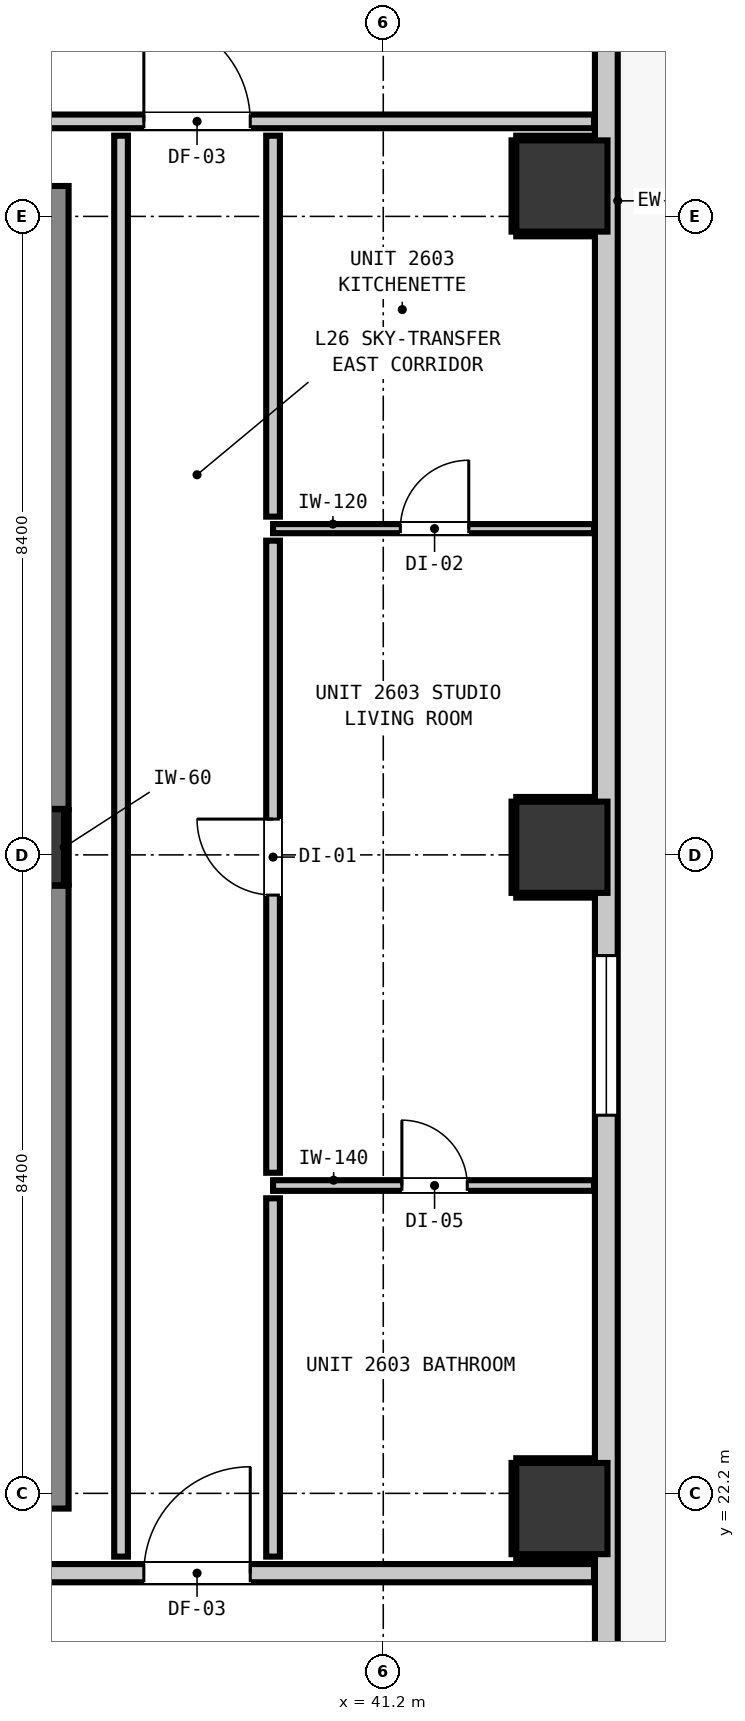
"""IFC4 building model, lengths in metres.
Left out: names, types, materials, properties, quantities, classifications, styles, units other than length and angle.
Written with IfcOpenShell. Run it as: python <this file> out.ifc"""

import sys

from ifc_helpers import new_model, si_unit, direction, frame, frame_2d, origin, origin_2d, place, context, subcontext, project, spatial, rectangle, extrude, element, fill, save


model = new_model("IFC4")
c1 = context("Model", 3, precision=1e-05, world=origin(), true_north=direction((0.0, 1.0)))
c2 = subcontext(c1, "Body", "Model", "MODEL_VIEW")
j1 = project(units=[si_unit("LENGTHUNIT", "METRE"), si_unit("PLANEANGLEUNIT", "RADIAN")], contexts=[c1])
p1 = place(None, origin())
s1 = spatial("IfcSite", under=j1, at=p1, CompositionType="ELEMENT")
p2 = place(p1, origin())
s2 = spatial("IfcBuilding", under=s1, at=p2, CompositionType="ELEMENT")
p3 = place(p2, frame((0.0, 0.0, 92.8)))
s3 = spatial("IfcBuildingStorey", under=s2, at=p3, CompositionType="ELEMENT", Elevation=92.8)
p4 = place(p3, frame((36.5, 30.7, 0.0), z_axis=(0.0, 0.0, 1.0), x_axis=(1.0, 0.0, 0.0)))
e1 = element("IfcColumn", 1, at=p4, inside=s3, PredefinedType="COLUMN", context=c2, shape_type="SweptSolid", body=[
    extrude(rectangle(XDim=1.0, YDim=1.0, at=origin_2d()), origin(), (0.0, 0.0, 1.0), 3.32),
])
p5 = place(p3, frame((36.56, 22.0, 0.0), z_axis=(0.0, 0.0, 1.0), x_axis=(0.0, 1.0, 0.0)))
e2 = element("IfcWall", 2, at=p5, inside=s3, PredefinedType="SHEAR", context=c2, shape_type="SweptSolid", body=[
    extrude(rectangle(XDim=8.195, YDim=1.0, at=frame_2d((4.098, 0.0))), origin(), (0.0, 0.0, 1.0), 3.32),
])
p6 = place(p3, frame((36.56, 31.205, 0.0), z_axis=(0.0, 0.0, 1.0), x_axis=(0.0, 1.0, 0.0)))
e3 = element("IfcWall", 3, at=p6, inside=s3, PredefinedType="SHEAR", context=c2, shape_type="SweptSolid", body=[
    extrude(rectangle(XDim=8.195, YDim=1.0, at=frame_2d((4.097, 0.0))), origin(), (0.0, 0.0, 1.0), 3.32),
])
for number, where, z_axis, x_axis in (
    (4, (43.55, 22.0, 0.0), (0.0, 0.0, 1.0), (1.0, 0.0, 0.0)),
    (5, (43.55, 30.7, 0.0), (0.0, 0.0, 1.0), (1.0, 0.0, 0.0)),
    (6, (43.55, 39.4, 0.0), (0.0, 0.0, 1.0), (1.0, 0.0, 0.0)),
):
    element("IfcColumn", number, at=place(p3, frame(where, z_axis=z_axis, x_axis=x_axis)), inside=s3, PredefinedType="COLUMN", context=c2, shape_type="SweptSolid", body=[
        extrude(rectangle(XDim=1.2, YDim=1.2, at=origin_2d()), origin(), (0.0, 0.0, 1.0), 3.32),
    ])
p7 = place(p3, frame((44.135, 51.035, 0.0), z_axis=(0.0, 0.0, 1.0), x_axis=(0.0, -1.0, 0.0)))
e7 = element("IfcWall", 7, at=p7, inside=s3, PredefinedType="STANDARD", context=c2, shape_type="SweptSolid", body=[
    extrude(rectangle(XDim=34.67, YDim=0.3, at=frame_2d((17.335, 0.0))), origin(), (0.0, 0.0, 1.0), 3.06),
])
p8 = place(p7, frame((0.901, 0.0, 0.0)))
e8 = element("IfcOpeningElement", 8, at=p8, cuts=e7, PredefinedType="OPENING", context=c2, shape_type="SweptSolid", body=[
    extrude(rectangle(XDim=1.0, YDim=2.15, at=frame_2d((0.5, 1.075))), frame((0.0, 0.16, 0.0), z_axis=(0.0, -1.0, 0.0), x_axis=(1.0, 0.0, 0.0)), (0.0, 0.0, 1.0), 0.32),
])
p9 = place(p7, frame((32.083, 0.0, 0.85)))
e9 = element("IfcOpeningElement", 9, at=p9, cuts=e7, PredefinedType="OPENING", context=c2, shape_type="SweptSolid", body=[
    extrude(rectangle(XDim=2.1, YDim=1.9, at=frame_2d((1.05, 0.95))), frame((0.0, 0.16, 0.0), z_axis=(0.0, -1.0, 0.0), x_axis=(1.0, 0.0, 0.0)), (0.0, 0.0, 1.0), 0.32),
])
p10 = place(p7, frame((21.76, 0.0, 0.85)))
e10 = element("IfcOpeningElement", 10, at=p10, cuts=e7, PredefinedType="OPENING", context=c2, shape_type="SweptSolid", body=[
    extrude(rectangle(XDim=2.1, YDim=1.9, at=frame_2d((1.05, 0.95))), frame((0.0, 0.16, 0.0), z_axis=(0.0, -1.0, 0.0), x_axis=(1.0, 0.0, 0.0)), (0.0, 0.0, 1.0), 0.32),
])
p11 = place(p3, frame((12.993, 21.15, 0.0), z_axis=(0.0, 0.0, 1.0), x_axis=(1.0, 0.0, 0.0)))
e11 = element("IfcWall", 11, at=p11, inside=s3, PredefinedType="PARTITIONING", context=c2, shape_type="SweptSolid", body=[
    extrude(rectangle(XDim=30.98, YDim=0.24, at=frame_2d((15.49, 0.0))), origin(), (0.0, 0.0, 1.0), 3.06),
])
p12 = place(p11, frame((5.217, 0.0, 0.0)))
e12 = element("IfcOpeningElement", 12, at=p12, cuts=e11, PredefinedType="OPENING", context=c2, shape_type="SweptSolid", body=[
    extrude(rectangle(XDim=1.1, YDim=2.15, at=frame_2d((0.55, 1.075))), frame((0.0, 0.13, 0.0), z_axis=(0.0, -1.0, 0.0), x_axis=(1.0, 0.0, 0.0)), (0.0, 0.0, 1.0), 0.26),
])
p13 = place(p11, frame((25.057, 0.0, 0.0)))
e13 = element("IfcOpeningElement", 13, at=p13, cuts=e11, PredefinedType="OPENING", context=c2, shape_type="SweptSolid", body=[
    extrude(rectangle(XDim=1.4, YDim=2.15, at=frame_2d((0.7, 1.075))), frame((0.0, 0.13, 0.0), z_axis=(0.0, -1.0, 0.0), x_axis=(1.0, 0.0, 0.0)), (0.0, 0.0, 1.0), 0.26),
])
p14 = place(p3, frame((1.827, 40.25, 0.0), z_axis=(0.0, 0.0, 1.0), x_axis=(1.0, 0.0, 0.0)))
e14 = element("IfcWall", 14, at=p14, inside=s3, PredefinedType="PARTITIONING", context=c2, shape_type="SweptSolid", body=[
    extrude(rectangle(XDim=42.146, YDim=0.18, at=frame_2d((21.073, 0.0))), origin(), (0.0, 0.0, 1.0), 3.06),
])
p15 = place(p14, frame((15.608, 0.0, 0.0)))
e15 = element("IfcOpeningElement", 15, at=p15, cuts=e14, PredefinedType="OPENING", context=c2, shape_type="SweptSolid", body=[
    extrude(rectangle(XDim=1.4, YDim=2.15, at=frame_2d((0.7, 1.075))), frame((0.0, 0.1, 0.0), z_axis=(0.0, -1.0, 0.0), x_axis=(1.0, 0.0, 0.0)), (0.0, 0.0, 1.0), 0.2),
])
p16 = place(p14, frame((8.623, 0.0, 0.0)))
e16 = element("IfcOpeningElement", 16, at=p16, cuts=e14, PredefinedType="OPENING", context=c2, shape_type="SweptSolid", body=[
    extrude(rectangle(XDim=1.4, YDim=2.15, at=frame_2d((0.7, 1.075))), frame((0.0, 0.1, 0.0), z_axis=(0.0, -1.0, 0.0), x_axis=(1.0, 0.0, 0.0)), (0.0, 0.0, 1.0), 0.2),
])
p17 = place(p14, frame((36.223, 0.0, 0.0)))
e17 = element("IfcOpeningElement", 17, at=p17, cuts=e14, PredefinedType="OPENING", context=c2, shape_type="SweptSolid", body=[
    extrude(rectangle(XDim=1.4, YDim=2.15, at=frame_2d((0.7, 1.075))), frame((0.0, 0.1, 0.0), z_axis=(0.0, -1.0, 0.0), x_axis=(1.0, 0.0, 0.0)), (0.0, 0.0, 1.0), 0.2),
])
p18 = place(p14, frame((3.697, 0.0, 0.0)))
e18 = element("IfcOpeningElement", 18, at=p18, cuts=e14, PredefinedType="OPENING", context=c2, shape_type="SweptSolid", body=[
    extrude(rectangle(XDim=0.95, YDim=2.1, at=frame_2d((0.475, 1.05))), frame((0.0, 0.1, 0.0), z_axis=(0.0, -1.0, 0.0), x_axis=(1.0, 0.0, 0.0)), (0.0, 0.0, 1.0), 0.2),
])
p19 = place(p3, frame((39.75, 26.25, 0.0), z_axis=(0.0, 0.0, 1.0), x_axis=(1.0, 0.0, 0.0)))
e19 = element("IfcWall", 19, at=p19, inside=s3, PredefinedType="PARTITIONING", context=c2, shape_type="SweptSolid", body=[
    extrude(rectangle(XDim=4.223, YDim=0.14, at=frame_2d((2.111, 0.0))), origin(), (0.0, 0.0, 1.0), 3.06),
])
p20 = place(p19, frame((1.695, 0.0, 0.0)))
e20 = element("IfcOpeningElement", 20, at=p20, cuts=e19, PredefinedType="OPENING", context=c2, shape_type="SweptSolid", body=[
    extrude(rectangle(XDim=0.86, YDim=2.02, at=frame_2d((0.43, 1.01))), frame((0.0, 0.08, 0.0), z_axis=(0.0, -1.0, 0.0), x_axis=(1.0, 0.0, 0.0)), (0.0, 0.0, 1.0), 0.16),
])
p21 = place(p3, frame((39.75, 34.892, 0.0), z_axis=(0.0, 0.0, 1.0), x_axis=(1.0, 0.0, 0.0)))
e21 = element("IfcWall", 21, at=p21, inside=s3, PredefinedType="PARTITIONING", context=c2, shape_type="SweptSolid", body=[
    extrude(rectangle(XDim=4.223, YDim=0.12, at=frame_2d((2.111, 0.0))), origin(), (0.0, 0.0, 1.0), 3.06),
])
p22 = place(p21, frame((1.675, 0.0, 0.0)))
e22 = element("IfcOpeningElement", 22, at=p22, cuts=e21, PredefinedType="OPENING", context=c2, shape_type="SweptSolid", body=[
    extrude(rectangle(XDim=0.9, YDim=2.1, at=frame_2d((0.45, 1.05))), frame((0.0, 0.07, 0.0), z_axis=(0.0, -1.0, 0.0), x_axis=(1.0, 0.0, 0.0)), (0.0, 0.0, 1.0), 0.14),
])
p23 = place(p3, frame((37.75, 21.368, 0.0), z_axis=(0.0, 0.0, 1.0), x_axis=(0.0, 1.0, 0.0)))
e23 = element("IfcWall", 23, at=p23, inside=s3, PredefinedType="PARTITIONING", context=c2, shape_type="SweptSolid", body=[
    extrude(rectangle(XDim=18.694, YDim=0.18, at=frame_2d((9.347, 0.0))), origin(), (0.0, 0.0, 1.0), 3.06),
])
p24 = place(p3, frame((39.75, 21.368, 0.0), z_axis=(0.0, 0.0, 1.0), x_axis=(0.0, 1.0, 0.0)))
e24 = element("IfcWall", 24, at=p24, inside=s3, PredefinedType="PARTITIONING", context=c2, shape_type="SweptSolid", body=[
    extrude(rectangle(XDim=4.714, YDim=0.18, at=frame_2d((2.357, 0.0))), origin(), (0.0, 0.0, 1.0), 3.06),
])
p25 = place(p3, frame((39.75, 26.418, 0.0), z_axis=(0.0, 0.0, 1.0), x_axis=(0.0, 1.0, 0.0)))
e25 = element("IfcWall", 25, at=p25, inside=s3, PredefinedType="PARTITIONING", context=c2, shape_type="SweptSolid", body=[
    extrude(rectangle(XDim=8.316, YDim=0.18, at=frame_2d((4.158, 0.0))), origin(), (0.0, 0.0, 1.0), 3.06),
])
p26 = place(p25, frame((3.653, 0.0, 0.0)))
e26 = element("IfcOpeningElement", 26, at=p26, cuts=e25, PredefinedType="OPENING", context=c2, shape_type="SweptSolid", body=[
    extrude(rectangle(XDim=1.0, YDim=2.15, at=frame_2d((0.5, 1.075))), frame((0.0, 0.1, 0.0), z_axis=(0.0, -1.0, 0.0), x_axis=(1.0, 0.0, 0.0)), (0.0, 0.0, 1.0), 0.2),
])
p27 = place(p3, frame((39.75, 35.05, 0.0), z_axis=(0.0, 0.0, 1.0), x_axis=(0.0, 1.0, 0.0)))
e27 = element("IfcWall", 27, at=p27, inside=s3, PredefinedType="PARTITIONING", context=c2, shape_type="SweptSolid", body=[
    extrude(rectangle(XDim=5.012, YDim=0.18, at=frame_2d((2.506, 0.0))), origin(), (0.0, 0.0, 1.0), 3.06),
])
p28 = place(p3, frame((37.032, 30.21, 0.0), z_axis=(0.0, 0.0, 1.0), x_axis=(0.0, 1.0, 0.0)))
e28 = element("IfcWall", 28, at=p28, inside=s3, PredefinedType="PARTITIONING", context=c2, shape_type="SweptSolid", body=[
    extrude(rectangle(XDim=0.98, YDim=0.06, at=frame_2d((0.49, 0.0))), origin(), (0.0, 0.0, 1.0), 1.45),
])
for number, where, z_axis, x_axis in (
    (29, (42.95, 21.368, 0.0), (0.0, 0.0, 1.0), (1.0, 0.0, 0.0)),
    (30, (42.95, 22.632, 0.0), (0.0, 0.0, 1.0), (1.0, 0.0, 0.0)),
):
    element("IfcWall", number, at=place(p3, frame(where, z_axis=z_axis, x_axis=x_axis)), inside=s3, PredefinedType="PARTITIONING", context=c2, shape_type="SweptSolid", body=[
        extrude(rectangle(XDim=1.02, YDim=0.06, at=frame_2d((0.51, 0.0))), origin(), (0.0, 0.0, 1.0), 1.45),
    ])
p29 = place(p3, frame((42.918, 21.4, 0.0), z_axis=(0.0, 0.0, 1.0), x_axis=(0.0, 1.0, 0.0)))
e31 = element("IfcWall", 31, at=p29, inside=s3, PredefinedType="PARTITIONING", context=c2, shape_type="SweptSolid", body=[
    extrude(rectangle(XDim=1.2, YDim=0.06, at=frame_2d((0.6, 0.0))), origin(), (0.0, 0.0, 1.0), 1.45),
])
for number, where, z_axis, x_axis in (
    (32, (42.95, 30.068, 0.0), (0.0, 0.0, 1.0), (1.0, 0.0, 0.0)),
    (33, (42.95, 31.332, 0.0), (0.0, 0.0, 1.0), (1.0, 0.0, 0.0)),
):
    element("IfcWall", number, at=place(p3, frame(where, z_axis=z_axis, x_axis=x_axis)), inside=s3, PredefinedType="PARTITIONING", context=c2, shape_type="SweptSolid", body=[
        extrude(rectangle(XDim=1.02, YDim=0.06, at=frame_2d((0.51, 0.0))), origin(), (0.0, 0.0, 1.0), 1.45),
    ])
p30 = place(p3, frame((42.918, 30.1, 0.0), z_axis=(0.0, 0.0, 1.0), x_axis=(0.0, 1.0, 0.0)))
e34 = element("IfcWall", 34, at=p30, inside=s3, PredefinedType="PARTITIONING", context=c2, shape_type="SweptSolid", body=[
    extrude(rectangle(XDim=1.2, YDim=0.06, at=frame_2d((0.6, 0.0))), origin(), (0.0, 0.0, 1.0), 1.45),
])
for number, where, z_axis, x_axis in (
    (35, (42.95, 38.768, 0.0), (0.0, 0.0, 1.0), (1.0, 0.0, 0.0)),
    (36, (42.95, 40.032, 0.0), (0.0, 0.0, 1.0), (1.0, 0.0, 0.0)),
):
    element("IfcWall", number, at=place(p3, frame(where, z_axis=z_axis, x_axis=x_axis)), inside=s3, PredefinedType="PARTITIONING", context=c2, shape_type="SweptSolid", body=[
        extrude(rectangle(XDim=1.02, YDim=0.06, at=frame_2d((0.51, 0.0))), origin(), (0.0, 0.0, 1.0), 1.45),
    ])
p31 = place(p3, frame((42.918, 38.8, 0.0), z_axis=(0.0, 0.0, 1.0), x_axis=(0.0, 1.0, 0.0)))
e37 = element("IfcWall", 37, at=p31, inside=s3, PredefinedType="PARTITIONING", context=c2, shape_type="SweptSolid", body=[
    extrude(rectangle(XDim=1.2, YDim=0.06, at=frame_2d((0.6, 0.0))), origin(), (0.0, 0.0, 1.0), 1.45),
])
p32 = place(p10, origin())
e38 = element("IfcWindow", 38, at=p32, inside=s3, PartitioningType="SINGLE_PANEL", PredefinedType="WINDOW", context=c2, shape_type="SweptSolid", body=[
    extrude(rectangle(XDim=2.1, YDim=1.9, at=frame_2d((1.05, 0.95))), frame((0.0, 0.03, 0.0), z_axis=(0.0, -1.0, 0.0), x_axis=(1.0, 0.0, 0.0)), (0.0, 0.0, 1.0), 0.06),
])
fill(e10, e38)
p33 = place(p13, origin())
e39 = element("IfcDoor", 39, at=p33, inside=s3, OperationType="SINGLE_SWING_RIGHT", PredefinedType="DOOR", context=c2, shape_type="SweptSolid", body=[
    extrude(rectangle(XDim=1.4, YDim=2.15, at=frame_2d((0.7, 1.075))), frame((0.0, 0.025, 0.0), z_axis=(0.0, -1.0, 0.0), x_axis=(1.0, 0.0, 0.0)), (0.0, 0.0, 1.0), 0.05),
])
fill(e13, e39)
p34 = place(p17, origin())
e40 = element("IfcDoor", 40, at=p34, inside=s3, OperationType="SINGLE_SWING_LEFT", PredefinedType="DOOR", context=c2, shape_type="SweptSolid", body=[
    extrude(rectangle(XDim=1.4, YDim=2.15, at=frame_2d((0.7, 1.075))), frame((0.0, 0.025, 0.0), z_axis=(0.0, -1.0, 0.0), x_axis=(1.0, 0.0, 0.0)), (0.0, 0.0, 1.0), 0.05),
])
fill(e17, e40)
p35 = place(p26, origin())
e41 = element("IfcDoor", 41, at=p35, inside=s3, OperationType="SINGLE_SWING_RIGHT", PredefinedType="DOOR", context=c2, shape_type="SweptSolid", body=[
    extrude(rectangle(XDim=1.0, YDim=2.15, at=frame_2d((0.5, 1.075))), frame((0.0, 0.025, 0.0), z_axis=(0.0, -1.0, 0.0), x_axis=(1.0, 0.0, 0.0)), (0.0, 0.0, 1.0), 0.05),
])
fill(e26, e41)
p36 = place(p20, origin())
e42 = element("IfcDoor", 42, at=p36, inside=s3, OperationType="SINGLE_SWING_LEFT", PredefinedType="DOOR", context=c2, shape_type="SweptSolid", body=[
    extrude(rectangle(XDim=0.86, YDim=2.02, at=frame_2d((0.43, 1.01))), frame((0.0, 0.025, 0.0), z_axis=(0.0, -1.0, 0.0), x_axis=(1.0, 0.0, 0.0)), (0.0, 0.0, 1.0), 0.05),
])
fill(e20, e42)
p37 = place(p22, origin())
e43 = element("IfcDoor", 43, at=p37, inside=s3, OperationType="SINGLE_SWING_RIGHT", PredefinedType="DOOR", context=c2, shape_type="SweptSolid", body=[
    extrude(rectangle(XDim=0.9, YDim=2.1, at=frame_2d((0.45, 1.05))), frame((0.0, 0.025, 0.0), z_axis=(0.0, -1.0, 0.0), x_axis=(1.0, 0.0, 0.0)), (0.0, 0.0, 1.0), 0.05),
])
fill(e22, e43)
save(model, sys.argv[1])
